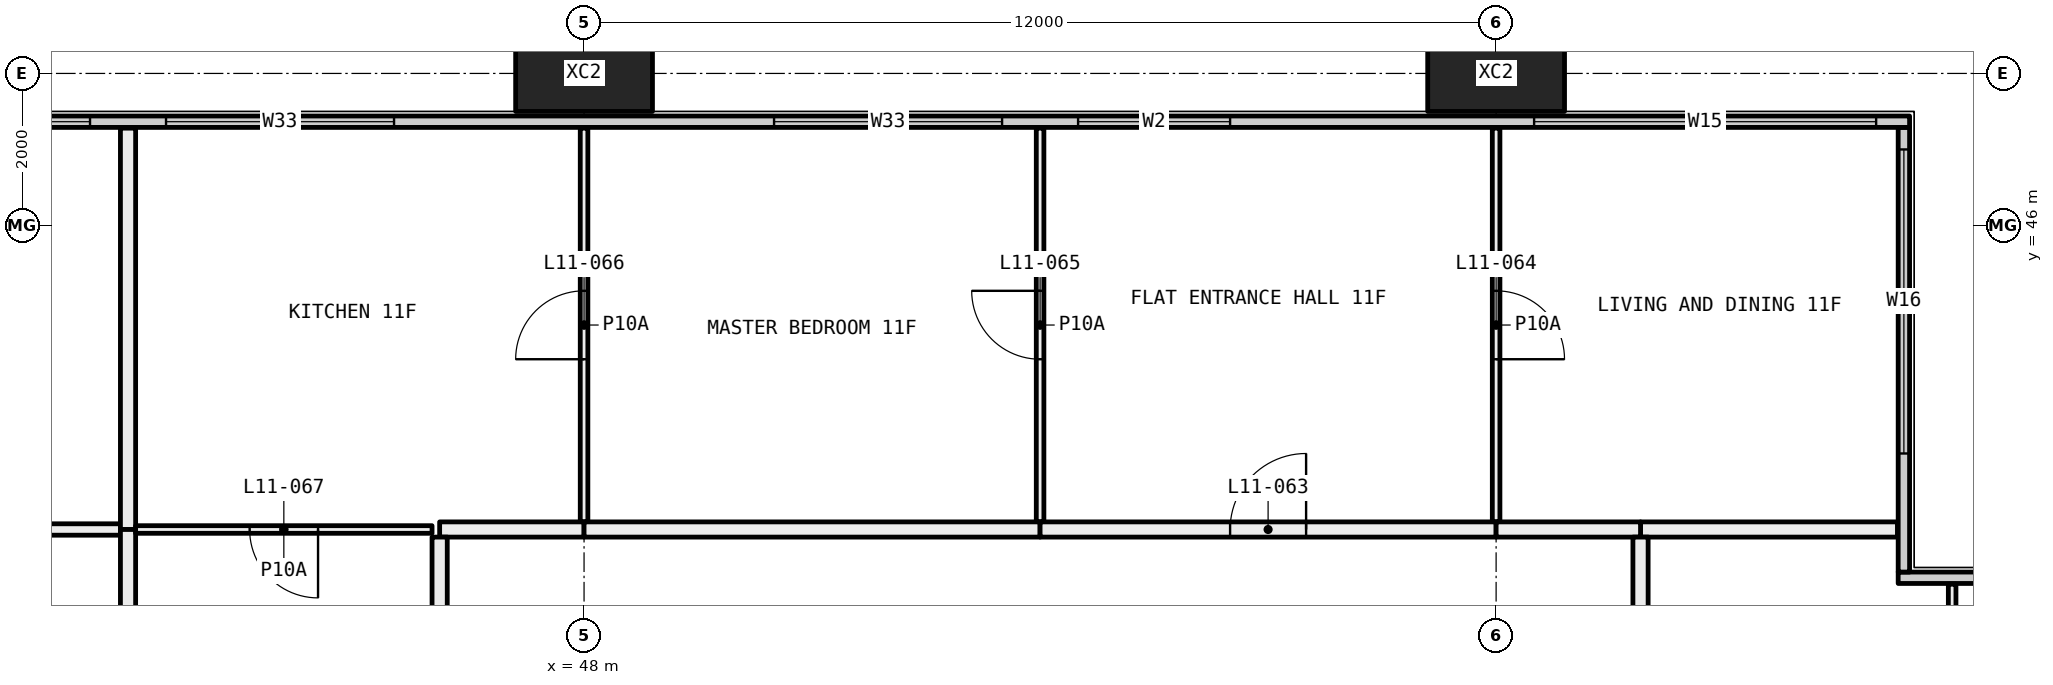
"""IFC4 building model, lengths in metres.
Left out: names, types, materials, properties, quantities, classifications, styles, units other than length and angle.
Written with IfcOpenShell. Run it as: python <this file> out.ifc"""

import sys

from ifc_helpers import new_model, si_unit, direction, frame, frame_2d, origin, origin_2d, place, context, subcontext, project, spatial, rectangle, hollow_rectangle, extrude, element, fill, save


model = new_model("IFC4")
c1 = context("Model", 3, precision=1e-05, world=origin(), true_north=direction((0.0, 1.0)))
c2 = subcontext(c1, "Body", "Model", "MODEL_VIEW")
j1 = project(units=[si_unit("LENGTHUNIT", "METRE"), si_unit("PLANEANGLEUNIT", "RADIAN")], contexts=[c1])
p1 = place(None, origin())
s1 = spatial("IfcSite", under=j1, at=p1, CompositionType="ELEMENT")
p2 = place(p1, origin())
s2 = spatial("IfcBuilding", under=s1, at=p2, CompositionType="ELEMENT")
p3 = place(p2, frame((0.0, 0.0, 50.7)))
s3 = spatial("IfcBuildingStorey", under=s2, at=p3, CompositionType="ELEMENT", Elevation=50.7)
for number, where, z_axis, x_axis in (
    (1, (48.0, 48.0, -0.4), (0.0, 0.0, 1.0), (1.0, 0.0, 0.0)),
    (2, (60.0, 48.0, -0.4), (0.0, 0.0, 1.0), (1.0, 0.0, 0.0)),
):
    element("IfcColumn", number, at=place(p3, frame(where, z_axis=z_axis, x_axis=x_axis)), inside=s3, PredefinedType="COLUMN", context=c2, shape_type="SweptSolid", body=[
        extrude(hollow_rectangle(XDim=1.8, YDim=1.0, WallThickness=0.07, at=origin_2d()), origin(), (0.0, 0.0, 1.0), 3.45),
    ])
p4 = place(p3, frame((65.29, 41.365, 0.0), z_axis=(0.0, 0.0, 1.0), x_axis=(1.0, 0.0, 0.0)))
e3 = element("IfcWall", 3, at=p4, inside=s3, PredefinedType="ELEMENTEDWALL", context=c2, shape_type="SweptSolid", body=[
    extrude(rectangle(XDim=6.15, YDim=0.15, at=frame_2d((3.075, 0.0))), origin(), (0.0, 0.0, 1.0), 3.05),
])
p5 = place(p4, frame((1.71, 0.0, 0.45)))
e4 = element("IfcOpeningElement", 4, at=p5, cuts=e3, PredefinedType="OPENING", context=c2, shape_type="SweptSolid", body=[
    extrude(rectangle(XDim=4.0, YDim=2.55, at=frame_2d((2.0, 1.275))), frame((0.0, 0.085, 0.0), z_axis=(0.0, -1.0, 0.0), x_axis=(1.0, 0.0, 0.0)), (0.0, 0.0, 1.0), 0.17),
])
p6 = place(p3, frame((65.365, 41.44, 0.0), z_axis=(0.0, 0.0, 1.0), x_axis=(0.0, 1.0, 0.0)))
e5 = element("IfcWall", 5, at=p6, inside=s3, PredefinedType="ELEMENTEDWALL", context=c2, shape_type="SweptSolid", body=[
    extrude(rectangle(XDim=5.85, YDim=0.15, at=frame_2d((2.925, 0.0))), origin(), (0.0, 0.0, 1.0), 3.05),
])
p7 = place(p6, frame((1.56, 0.0, 0.45)))
e6 = element("IfcOpeningElement", 6, at=p7, cuts=e5, PredefinedType="OPENING", context=c2, shape_type="SweptSolid", body=[
    extrude(rectangle(XDim=4.0, YDim=2.55, at=frame_2d((2.0, 1.275))), frame((0.0, 0.085, 0.0), z_axis=(0.0, -1.0, 0.0), x_axis=(1.0, 0.0, 0.0)), (0.0, 0.0, 1.0), 0.17),
])
p8 = place(p3, frame((6.56, 47.365, 0.0), z_axis=(0.0, 0.0, 1.0), x_axis=(1.0, 0.0, 0.0)))
e7 = element("IfcWall", 7, at=p8, inside=s3, PredefinedType="ELEMENTEDWALL", context=c2, shape_type="SweptSolid", body=[
    extrude(rectangle(XDim=58.88, YDim=0.15, at=frame_2d((29.44, 0.0))), origin(), (0.0, 0.0, 1.0), 3.05),
])
p9 = place(p8, frame((0.44, 0.0, 0.45)))
e8 = element("IfcOpeningElement", 8, at=p9, cuts=e7, PredefinedType="OPENING", context=c2, shape_type="SweptSolid", body=[
    extrude(rectangle(XDim=4.5, YDim=2.55, at=frame_2d((2.25, 1.275))), frame((0.0, 0.085, 0.0), z_axis=(0.0, -1.0, 0.0), x_axis=(1.0, 0.0, 0.0)), (0.0, 0.0, 1.0), 0.17),
])
p10 = place(p8, frame((7.94, 0.0, 0.45)))
e9 = element("IfcOpeningElement", 9, at=p10, cuts=e7, PredefinedType="OPENING", context=c2, shape_type="SweptSolid", body=[
    extrude(rectangle(XDim=3.0, YDim=2.55, at=frame_2d((1.5, 1.275))), frame((0.0, 0.085, 0.0), z_axis=(0.0, -1.0, 0.0), x_axis=(1.0, 0.0, 0.0)), (0.0, 0.0, 1.0), 0.17),
])
p11 = place(p8, frame((11.94, 0.0, 0.45)))
e10 = element("IfcOpeningElement", 10, at=p11, cuts=e7, PredefinedType="OPENING", context=c2, shape_type="SweptSolid", body=[
    extrude(rectangle(XDim=3.0, YDim=2.55, at=frame_2d((1.5, 1.275))), frame((0.0, 0.085, 0.0), z_axis=(0.0, -1.0, 0.0), x_axis=(1.0, 0.0, 0.0)), (0.0, 0.0, 1.0), 0.17),
])
p12 = place(p8, frame((19.94, 0.0, 0.45)))
e11 = element("IfcOpeningElement", 11, at=p12, cuts=e7, PredefinedType="OPENING", context=c2, shape_type="SweptSolid", body=[
    extrude(rectangle(XDim=3.0, YDim=2.55, at=frame_2d((1.5, 1.275))), frame((0.0, 0.085, 0.0), z_axis=(0.0, -1.0, 0.0), x_axis=(1.0, 0.0, 0.0)), (0.0, 0.0, 1.0), 0.17),
])
p13 = place(p8, frame((23.94, 0.0, 0.45)))
e12 = element("IfcOpeningElement", 12, at=p13, cuts=e7, PredefinedType="OPENING", context=c2, shape_type="SweptSolid", body=[
    extrude(rectangle(XDim=2.0, YDim=2.55, at=frame_2d((1.0, 1.275))), frame((0.0, 0.085, 0.0), z_axis=(0.0, -1.0, 0.0), x_axis=(1.0, 0.0, 0.0)), (0.0, 0.0, 1.0), 0.17),
])
p14 = place(p8, frame((31.94, 0.0, 0.45)))
e13 = element("IfcOpeningElement", 13, at=p14, cuts=e7, PredefinedType="OPENING", context=c2, shape_type="SweptSolid", body=[
    extrude(rectangle(XDim=3.0, YDim=2.55, at=frame_2d((1.5, 1.275))), frame((0.0, 0.085, 0.0), z_axis=(0.0, -1.0, 0.0), x_axis=(1.0, 0.0, 0.0)), (0.0, 0.0, 1.0), 0.17),
])
p15 = place(p8, frame((35.94, 0.0, 0.45)))
e14 = element("IfcOpeningElement", 14, at=p15, cuts=e7, PredefinedType="OPENING", context=c2, shape_type="SweptSolid", body=[
    extrude(rectangle(XDim=3.0, YDim=2.55, at=frame_2d((1.5, 1.275))), frame((0.0, 0.085, 0.0), z_axis=(0.0, -1.0, 0.0), x_axis=(1.0, 0.0, 0.0)), (0.0, 0.0, 1.0), 0.17),
])
p16 = place(p8, frame((43.94, 0.0, 0.45)))
e15 = element("IfcOpeningElement", 15, at=p16, cuts=e7, PredefinedType="OPENING", context=c2, shape_type="SweptSolid", body=[
    extrude(rectangle(XDim=3.0, YDim=2.55, at=frame_2d((1.5, 1.275))), frame((0.0, 0.085, 0.0), z_axis=(0.0, -1.0, 0.0), x_axis=(1.0, 0.0, 0.0)), (0.0, 0.0, 1.0), 0.17),
])
p17 = place(p8, frame((47.94, 0.0, 0.45)))
e16 = element("IfcOpeningElement", 16, at=p17, cuts=e7, PredefinedType="OPENING", context=c2, shape_type="SweptSolid", body=[
    extrude(rectangle(XDim=2.0, YDim=2.55, at=frame_2d((1.0, 1.275))), frame((0.0, 0.085, 0.0), z_axis=(0.0, -1.0, 0.0), x_axis=(1.0, 0.0, 0.0)), (0.0, 0.0, 1.0), 0.17),
])
p18 = place(p8, frame((53.94, 0.0, 0.45)))
e17 = element("IfcOpeningElement", 17, at=p18, cuts=e7, PredefinedType="OPENING", context=c2, shape_type="SweptSolid", body=[
    extrude(rectangle(XDim=4.5, YDim=2.55, at=frame_2d((2.25, 1.275))), frame((0.0, 0.085, 0.0), z_axis=(0.0, -1.0, 0.0), x_axis=(1.0, 0.0, 0.0)), (0.0, 0.0, 1.0), 0.17),
])
p19 = place(p3, frame((36.0, 42.0, 0.0), z_axis=(0.0, 0.0, 1.0), x_axis=(1.0, 0.0, 0.0)))
e18 = element("IfcWall", 18, at=p19, inside=s3, PredefinedType="PARTITIONING", context=c2, shape_type="SweptSolid", body=[
    extrude(rectangle(XDim=5.9, YDim=0.15, at=frame_2d((2.95, 0.0))), origin(), (0.0, 0.0, 1.0), 2.45),
])
p20 = place(p19, frame((2.5, 0.0, 0.0)))
e19 = element("IfcOpeningElement", 19, at=p20, cuts=e18, PredefinedType="OPENING", context=c2, shape_type="SweptSolid", body=[
    extrude(rectangle(XDim=0.9, YDim=2.1, at=frame_2d((0.45, 1.05))), frame((0.0, 0.085, 0.0), z_axis=(0.0, -1.0, 0.0), x_axis=(1.0, 0.0, 0.0)), (0.0, 0.0, 1.0), 0.17),
])
p21 = place(p3, frame((42.0, 42.0, 0.0), z_axis=(0.0, 0.0, 1.0), x_axis=(0.0, 1.0, 0.0)))
e20 = element("IfcWall", 20, at=p21, inside=s3, PredefinedType="PARTITIONING", context=c2, shape_type="SweptSolid", body=[
    extrude(rectangle(XDim=5.28, YDim=0.2, at=frame_2d((2.64, 0.0))), origin(), (0.0, 0.0, 1.0), 3.05),
])
p22 = place(p3, frame((42.0, 38.1, 0.0), z_axis=(0.0, 0.0, 1.0), x_axis=(0.0, 1.0, 0.0)))
e21 = element("IfcWall", 21, at=p22, inside=s3, PredefinedType="PARTITIONING", context=c2, shape_type="SweptSolid", body=[
    extrude(rectangle(XDim=3.9, YDim=0.2, at=frame_2d((1.95, 0.0))), origin(), (0.0, 0.0, 1.0), 3.05),
])
p23 = place(p3, frame((48.0, 42.1, 0.0), z_axis=(0.0, 0.0, 1.0), x_axis=(0.0, 1.0, 0.0)))
e22 = element("IfcWall", 22, at=p23, inside=s3, PredefinedType="PARTITIONING", context=c2, shape_type="SweptSolid", body=[
    extrude(rectangle(XDim=5.18, YDim=0.1, at=frame_2d((2.59, 0.0))), origin(), (0.0, 0.0, 1.0), 3.05),
])
p24 = place(p23, frame((2.14, 0.0, 0.0)))
e23 = element("IfcOpeningElement", 23, at=p24, cuts=e22, PredefinedType="OPENING", context=c2, shape_type="SweptSolid", body=[
    extrude(rectangle(XDim=0.9, YDim=2.1, at=frame_2d((0.45, 1.05))), frame((0.0, 0.06, 0.0), z_axis=(0.0, -1.0, 0.0), x_axis=(1.0, 0.0, 0.0)), (0.0, 0.0, 1.0), 0.12),
])
p25 = place(p3, frame((42.1, 42.0, 0.0), z_axis=(0.0, 0.0, 1.0), x_axis=(1.0, 0.0, 0.0)))
e24 = element("IfcWall", 24, at=p25, inside=s3, PredefinedType="PARTITIONING", context=c2, shape_type="SweptSolid", body=[
    extrude(rectangle(XDim=3.9, YDim=0.1, at=frame_2d((1.95, 0.0))), origin(), (0.0, 0.0, 1.0), 3.05),
])
p26 = place(p25, frame((1.5, 0.0, 0.0)))
e25 = element("IfcOpeningElement", 25, at=p26, cuts=e24, PredefinedType="OPENING", context=c2, shape_type="SweptSolid", body=[
    extrude(rectangle(XDim=0.9, YDim=2.1, at=frame_2d((0.45, 1.05))), frame((0.0, 0.06, 0.0), z_axis=(0.0, -1.0, 0.0), x_axis=(1.0, 0.0, 0.0)), (0.0, 0.0, 1.0), 0.12),
])
p27 = place(p3, frame((46.1, 42.0, 0.0), z_axis=(0.0, 0.0, 1.0), x_axis=(1.0, 0.0, 0.0)))
e26 = element("IfcWall", 26, at=p27, inside=s3, PredefinedType="PARTITIONING", context=c2, shape_type="SweptSolid", body=[
    extrude(rectangle(XDim=1.9, YDim=0.2, at=frame_2d((0.95, 0.0))), origin(), (0.0, 0.0, 1.0), 3.05),
])
p28 = place(p3, frame((54.0, 42.1, 0.0), z_axis=(0.0, 0.0, 1.0), x_axis=(0.0, 1.0, 0.0)))
e27 = element("IfcWall", 27, at=p28, inside=s3, PredefinedType="PARTITIONING", context=c2, shape_type="SweptSolid", body=[
    extrude(rectangle(XDim=5.18, YDim=0.1, at=frame_2d((2.59, 0.0))), origin(), (0.0, 0.0, 1.0), 3.05),
])
p29 = place(p28, frame((2.14, 0.0, 0.0)))
e28 = element("IfcOpeningElement", 28, at=p29, cuts=e27, PredefinedType="OPENING", context=c2, shape_type="SweptSolid", body=[
    extrude(rectangle(XDim=0.9, YDim=2.1, at=frame_2d((0.45, 1.05))), frame((0.0, 0.06, 0.0), z_axis=(0.0, -1.0, 0.0), x_axis=(1.0, 0.0, 0.0)), (0.0, 0.0, 1.0), 0.12),
])
p30 = place(p3, frame((48.0, 42.0, 0.0), z_axis=(0.0, 0.0, 1.0), x_axis=(1.0, 0.0, 0.0)))
e29 = element("IfcWall", 29, at=p30, inside=s3, PredefinedType="PARTITIONING", context=c2, shape_type="SweptSolid", body=[
    extrude(rectangle(XDim=6.0, YDim=0.2, at=frame_2d((3.0, 0.0))), origin(), (0.0, 0.0, 1.0), 3.05),
])
p31 = place(p3, frame((60.0, 42.1, 0.0), z_axis=(0.0, 0.0, 1.0), x_axis=(0.0, 1.0, 0.0)))
e30 = element("IfcWall", 30, at=p31, inside=s3, PredefinedType="PARTITIONING", context=c2, shape_type="SweptSolid", body=[
    extrude(rectangle(XDim=5.18, YDim=0.1, at=frame_2d((2.59, 0.0))), origin(), (0.0, 0.0, 1.0), 3.05),
])
p32 = place(p31, frame((2.14, 0.0, 0.0)))
e31 = element("IfcOpeningElement", 31, at=p32, cuts=e30, PredefinedType="OPENING", context=c2, shape_type="SweptSolid", body=[
    extrude(rectangle(XDim=0.9, YDim=2.1, at=frame_2d((0.45, 1.05))), frame((0.0, 0.06, 0.0), z_axis=(0.0, -1.0, 0.0), x_axis=(1.0, 0.0, 0.0)), (0.0, 0.0, 1.0), 0.12),
])
p33 = place(p3, frame((54.0, 42.0, 0.0), z_axis=(0.0, 0.0, 1.0), x_axis=(1.0, 0.0, 0.0)))
e32 = element("IfcWall", 32, at=p33, inside=s3, PredefinedType="PARTITIONING", context=c2, shape_type="SweptSolid", body=[
    extrude(rectangle(XDim=6.0, YDim=0.2, at=frame_2d((3.0, 0.0))), origin(), (0.0, 0.0, 1.0), 3.05),
])
p34 = place(p33, frame((2.5, 0.0, 0.0)))
e33 = element("IfcOpeningElement", 33, at=p34, cuts=e32, PredefinedType="OPENING", context=c2, shape_type="SweptSolid", body=[
    extrude(rectangle(XDim=1.0, YDim=2.1, at=frame_2d((0.5, 1.05))), frame((0.0, 0.11, 0.0), z_axis=(0.0, -1.0, 0.0), x_axis=(1.0, 0.0, 0.0)), (0.0, 0.0, 1.0), 0.22),
])
p35 = place(p3, frame((61.9, 42.0, 0.0), z_axis=(0.0, 0.0, 1.0), x_axis=(1.0, 0.0, 0.0)))
e34 = element("IfcWall", 34, at=p35, inside=s3, PredefinedType="PARTITIONING", context=c2, shape_type="SweptSolid", body=[
    extrude(rectangle(XDim=3.38, YDim=0.2, at=frame_2d((1.69, 0.0))), origin(), (0.0, 0.0, 1.0), 3.05),
])
p36 = place(p3, frame((60.0, 42.0, 0.0), z_axis=(0.0, 0.0, 1.0), x_axis=(1.0, 0.0, 0.0)))
e35 = element("IfcWall", 35, at=p36, inside=s3, PredefinedType="PARTITIONING", context=c2, shape_type="SweptSolid", body=[
    extrude(rectangle(XDim=1.9, YDim=0.2, at=frame_2d((0.95, 0.0))), origin(), (0.0, 0.0, 1.0), 3.05),
])
p37 = place(p3, frame((46.1, 36.1, 0.0), z_axis=(0.0, 0.0, 1.0), x_axis=(0.0, 1.0, 0.0)))
e36 = element("IfcWall", 36, at=p37, inside=s3, PredefinedType="PARTITIONING", context=c2, shape_type="SweptSolid", body=[
    extrude(rectangle(XDim=5.8, YDim=0.2, at=frame_2d((2.9, 0.0))), origin(), (0.0, 0.0, 1.0), 3.05),
])
p38 = place(p3, frame((66.0, 41.28, 0.0), z_axis=(0.0, 0.0, 1.0), x_axis=(0.0, -1.0, 0.0)))
e37 = element("IfcWall", 37, at=p38, inside=s3, PredefinedType="PARTITIONING", context=c2, shape_type="SweptSolid", body=[
    extrude(rectangle(XDim=3.78, YDim=0.1, at=frame_2d((1.89, 0.0))), origin(), (0.0, 0.0, 1.0), 3.05),
])
p39 = place(p3, frame((61.9, 41.9, 0.0), z_axis=(0.0, 0.0, 1.0), x_axis=(0.0, -1.0, 0.0)))
e38 = element("IfcWall", 38, at=p39, inside=s3, PredefinedType="PARTITIONING", context=c2, shape_type="SweptSolid", body=[
    extrude(rectangle(XDim=4.4, YDim=0.2, at=frame_2d((2.2, 0.0))), origin(), (0.0, 0.0, 1.0), 3.05),
])
p40 = place(p7, origin())
e39 = element("IfcWindow", 39, at=p40, inside=s3, PartitioningType="SINGLE_PANEL", PredefinedType="WINDOW", context=c2, shape_type="SweptSolid", body=[
    extrude(rectangle(XDim=4.0, YDim=2.55, at=frame_2d((2.0, 1.275))), frame((0.0, 0.03, 0.0), z_axis=(0.0, -1.0, 0.0), x_axis=(1.0, 0.0, 0.0)), (0.0, 0.0, 1.0), 0.06),
])
fill(e6, e39)
p41 = place(p14, origin())
e40 = element("IfcWindow", 40, at=p41, inside=s3, PartitioningType="SINGLE_PANEL", PredefinedType="WINDOW", context=c2, shape_type="SweptSolid", body=[
    extrude(rectangle(XDim=3.0, YDim=2.55, at=frame_2d((1.5, 1.275))), frame((0.0, 0.03, 0.0), z_axis=(0.0, -1.0, 0.0), x_axis=(1.0, 0.0, 0.0)), (0.0, 0.0, 1.0), 0.06),
])
fill(e13, e40)
p42 = place(p15, origin())
e41 = element("IfcWindow", 41, at=p42, inside=s3, PartitioningType="SINGLE_PANEL", PredefinedType="WINDOW", context=c2, shape_type="SweptSolid", body=[
    extrude(rectangle(XDim=3.0, YDim=2.55, at=frame_2d((1.5, 1.275))), frame((0.0, 0.03, 0.0), z_axis=(0.0, -1.0, 0.0), x_axis=(1.0, 0.0, 0.0)), (0.0, 0.0, 1.0), 0.06),
])
fill(e14, e41)
p43 = place(p16, origin())
e42 = element("IfcWindow", 42, at=p43, inside=s3, PartitioningType="SINGLE_PANEL", PredefinedType="WINDOW", context=c2, shape_type="SweptSolid", body=[
    extrude(rectangle(XDim=3.0, YDim=2.55, at=frame_2d((1.5, 1.275))), frame((0.0, 0.03, 0.0), z_axis=(0.0, -1.0, 0.0), x_axis=(1.0, 0.0, 0.0)), (0.0, 0.0, 1.0), 0.06),
])
fill(e15, e42)
p44 = place(p17, origin())
e43 = element("IfcWindow", 43, at=p44, inside=s3, PartitioningType="SINGLE_PANEL", PredefinedType="WINDOW", context=c2, shape_type="SweptSolid", body=[
    extrude(rectangle(XDim=2.0, YDim=2.55, at=frame_2d((1.0, 1.275))), frame((0.0, 0.03, 0.0), z_axis=(0.0, -1.0, 0.0), x_axis=(1.0, 0.0, 0.0)), (0.0, 0.0, 1.0), 0.06),
])
fill(e16, e43)
p45 = place(p18, origin())
e44 = element("IfcWindow", 44, at=p45, inside=s3, PartitioningType="SINGLE_PANEL", PredefinedType="WINDOW", context=c2, shape_type="SweptSolid", body=[
    extrude(rectangle(XDim=4.5, YDim=2.55, at=frame_2d((2.25, 1.275))), frame((0.0, 0.03, 0.0), z_axis=(0.0, -1.0, 0.0), x_axis=(1.0, 0.0, 0.0)), (0.0, 0.0, 1.0), 0.06),
])
fill(e17, e44)
p46 = place(p34, origin())
e45 = element("IfcDoor", 45, at=p46, inside=s3, OperationType="SINGLE_SWING_LEFT", PredefinedType="DOOR", context=c2, shape_type="SweptSolid", body=[
    extrude(rectangle(XDim=1.0, YDim=2.1, at=frame_2d((0.5, 1.05))), frame((0.0, 0.025, 0.0), z_axis=(0.0, -1.0, 0.0), x_axis=(1.0, 0.0, 0.0)), (0.0, 0.0, 1.0), 0.05),
])
fill(e33, e45)
p47 = place(p32, frame((0.9, 0.0, 0.0), x_axis=(-1.0, 0.0, 0.0)))
e46 = element("IfcDoor", 46, at=p47, inside=s3, OperationType="SINGLE_SWING_LEFT", PredefinedType="DOOR", context=c2, shape_type="SweptSolid", body=[
    extrude(rectangle(XDim=0.9, YDim=2.1, at=frame_2d((0.45, 1.05))), frame((0.0, 0.025, 0.0), z_axis=(0.0, -1.0, 0.0), x_axis=(1.0, 0.0, 0.0)), (0.0, 0.0, 1.0), 0.05),
])
fill(e31, e46)
p48 = place(p29, origin())
e47 = element("IfcDoor", 47, at=p48, inside=s3, OperationType="SINGLE_SWING_LEFT", PredefinedType="DOOR", context=c2, shape_type="SweptSolid", body=[
    extrude(rectangle(XDim=0.9, YDim=2.1, at=frame_2d((0.45, 1.05))), frame((0.0, 0.025, 0.0), z_axis=(0.0, -1.0, 0.0), x_axis=(1.0, 0.0, 0.0)), (0.0, 0.0, 1.0), 0.05),
])
fill(e28, e47)
p49 = place(p24, origin())
e48 = element("IfcDoor", 48, at=p49, inside=s3, OperationType="SINGLE_SWING_RIGHT", PredefinedType="DOOR", context=c2, shape_type="SweptSolid", body=[
    extrude(rectangle(XDim=0.9, YDim=2.1, at=frame_2d((0.45, 1.05))), frame((0.0, 0.025, 0.0), z_axis=(0.0, -1.0, 0.0), x_axis=(1.0, 0.0, 0.0)), (0.0, 0.0, 1.0), 0.05),
])
fill(e23, e48)
p50 = place(p26, frame((0.9, 0.0, 0.0), x_axis=(-1.0, 0.0, 0.0)))
e49 = element("IfcDoor", 49, at=p50, inside=s3, OperationType="SINGLE_SWING_RIGHT", PredefinedType="DOOR", context=c2, shape_type="SweptSolid", body=[
    extrude(rectangle(XDim=0.9, YDim=2.1, at=frame_2d((0.45, 1.05))), frame((0.0, 0.025, 0.0), z_axis=(0.0, -1.0, 0.0), x_axis=(1.0, 0.0, 0.0)), (0.0, 0.0, 1.0), 0.05),
])
fill(e25, e49)
save(model, sys.argv[1])
